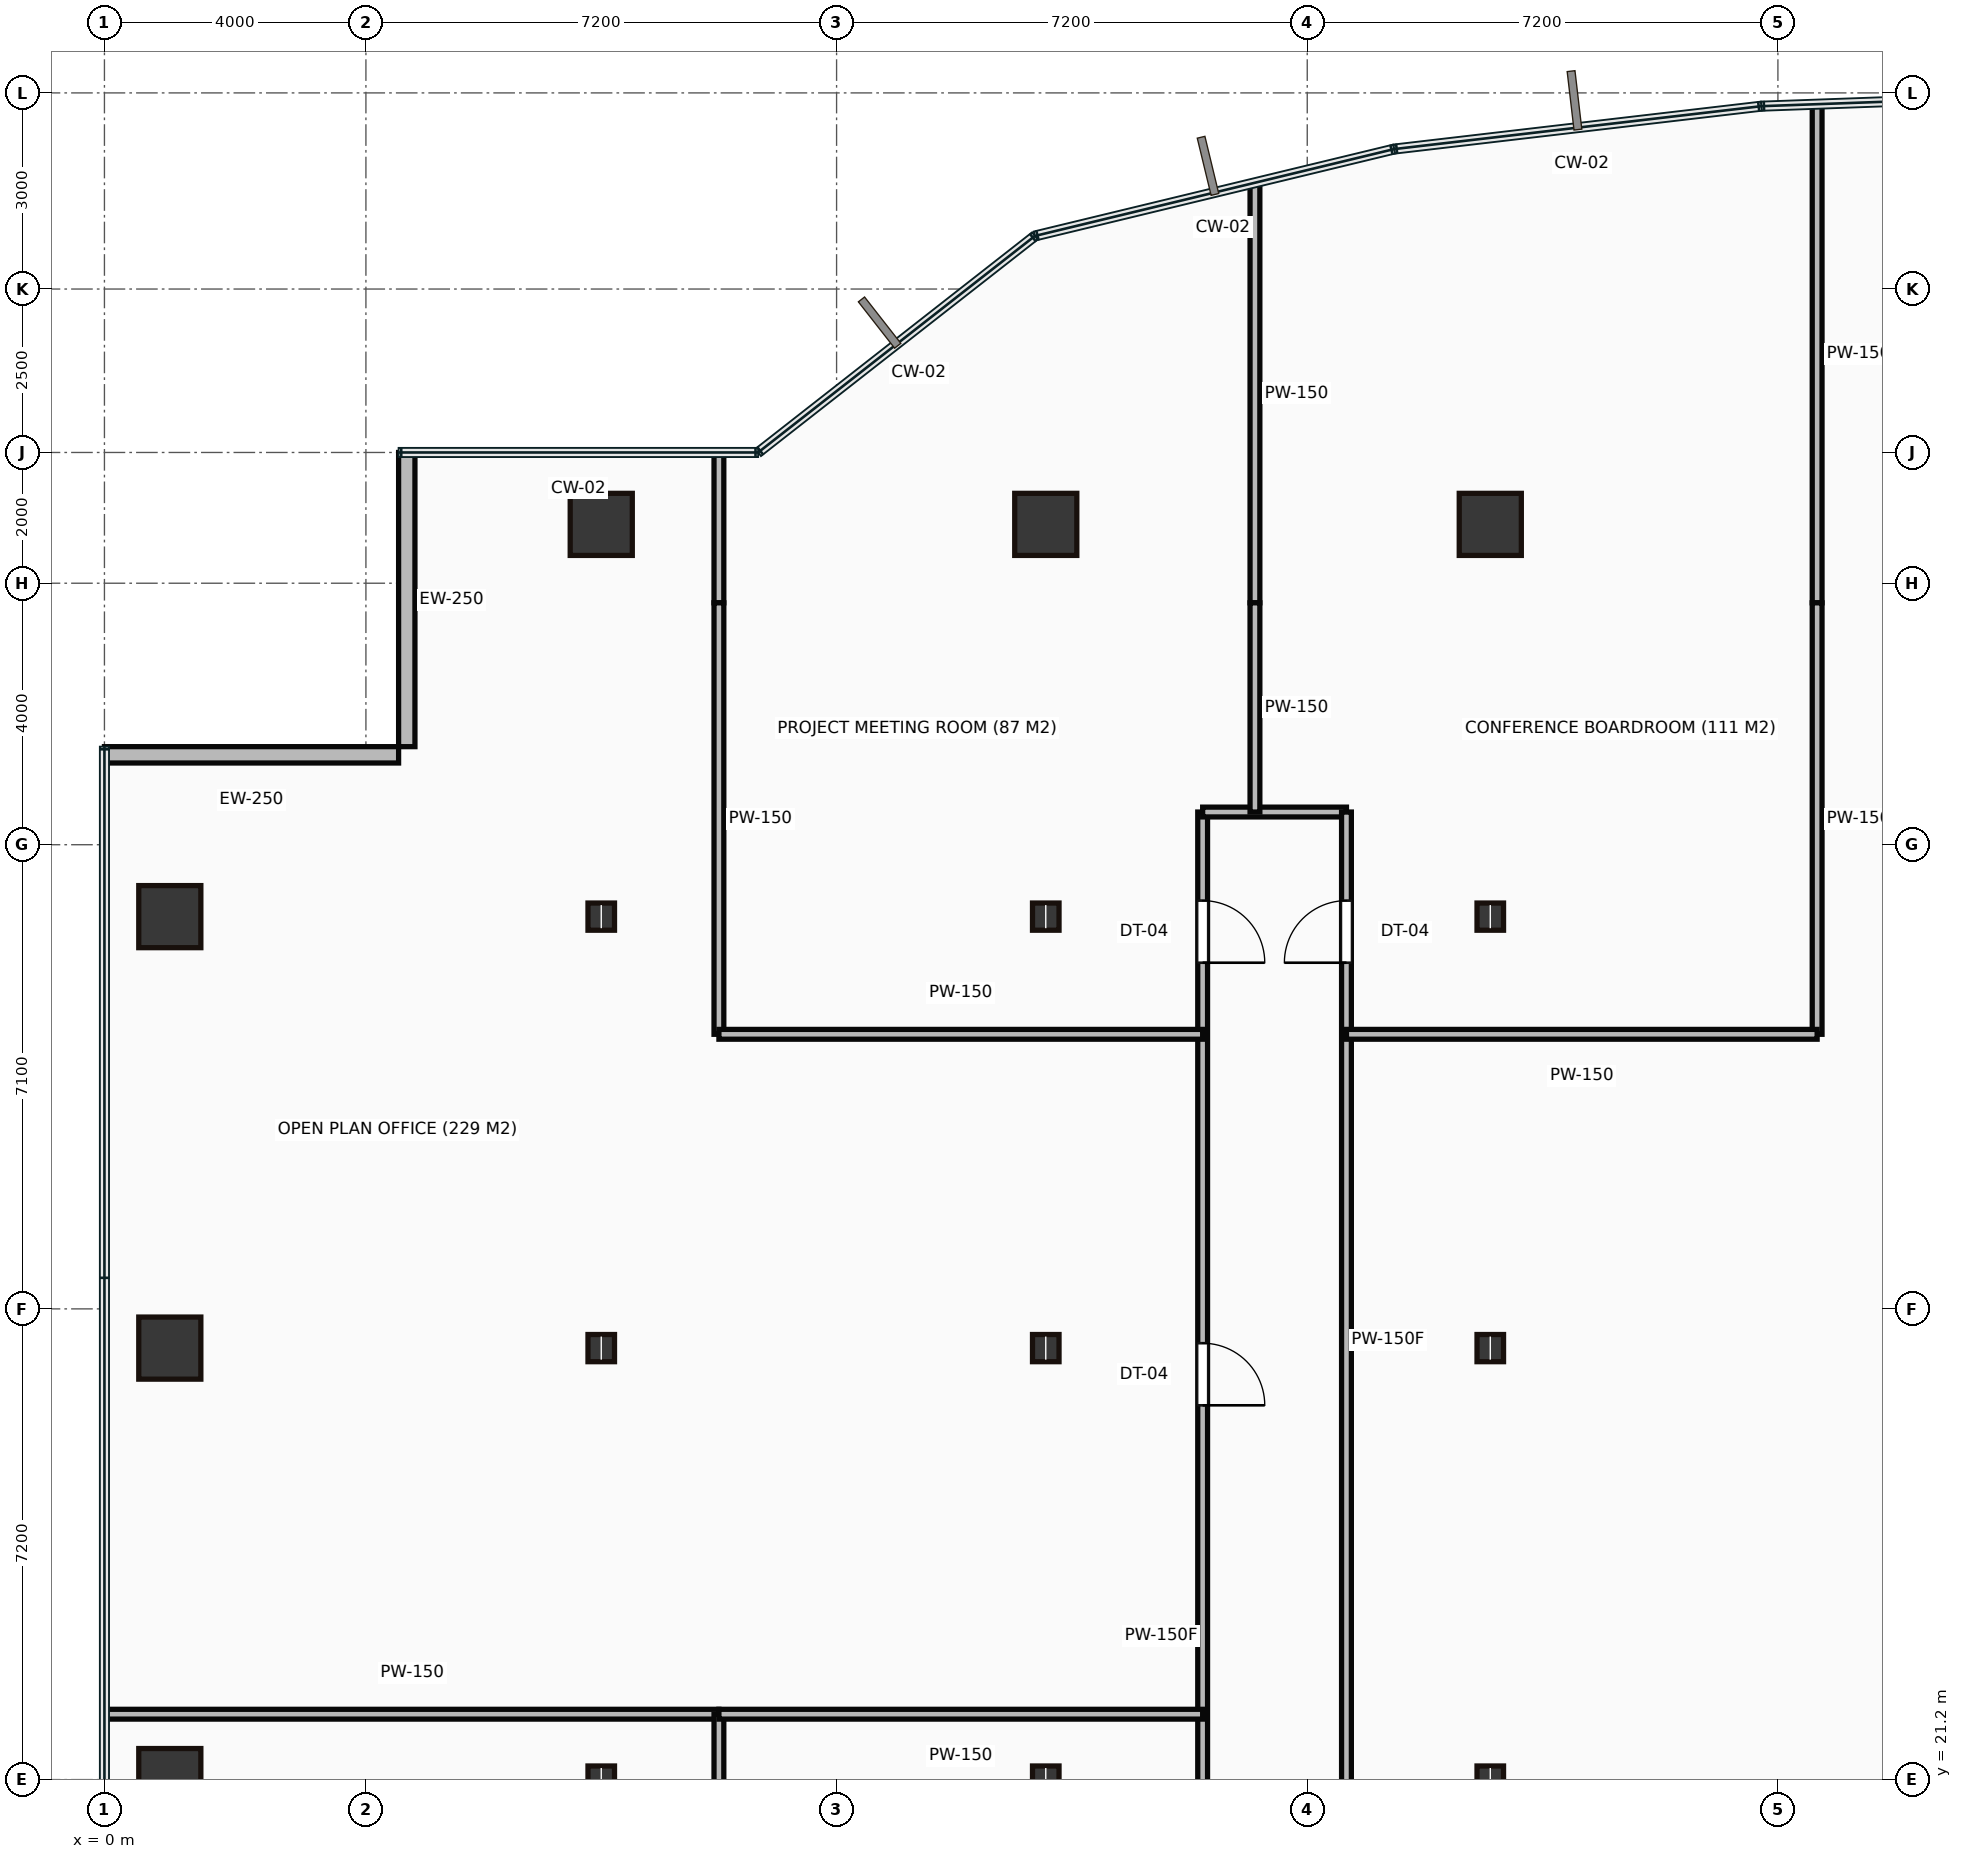
"""IFC4 building model, lengths in metres.
Left out: names, types, materials, properties, quantities, classifications, styles, units other than length and angle.
Written with IfcOpenShell. Run it as: python <this file> out.ifc"""

import sys

from ifc_helpers import new_model, si_unit, direction, frame, frame_2d, origin, origin_2d, place, context, subcontext, project, spatial, rectangle, hollow_rectangle, i_section, extrude, source, transform, mapped, element, fill, save


model = new_model("IFC4")
c1 = context("Model", 3, precision=1e-05, world=origin(), true_north=direction((0.0, 1.0)))
c2 = subcontext(c1, "Body", "Model", "MODEL_VIEW")
j1 = project(units=[si_unit("LENGTHUNIT", "METRE"), si_unit("PLANEANGLEUNIT", "RADIAN")], contexts=[c1])
p1 = place(None, origin())
s1 = spatial("IfcSite", under=j1, at=p1, CompositionType="ELEMENT")
p2 = place(p1, origin())
s2 = spatial("IfcBuilding", under=s1, at=p2, CompositionType="ELEMENT")
p3 = place(p2, frame((0.0, 0.0, 76.3)))
s3 = spatial("IfcBuildingStorey", under=s2, at=p3, CompositionType="ELEMENT", Elevation=76.3)
m1 = source(origin(), c2, "Body", "SweptSolid", [
    extrude(hollow_rectangle(XDim=0.95, YDim=0.95, WallThickness=0.045, at=origin_2d()), origin(), (0.0, 0.0, 1.0), 3.65),
])
for number, where, z_axis, x_axis in (
    (1, (1.0, 21.2, 0.0), (0.0, 0.0, 1.0), (1.0, 0.0, 0.0)),
    (2, (1.0, 27.8, 0.0), (0.0, 0.0, 1.0), (1.0, 0.0, 0.0)),
    (3, (1.0, 34.4, 0.0), (0.0, 0.0, 1.0), (1.0, 0.0, 0.0)),
):
    element("IfcColumn", number, at=place(p3, frame(where, z_axis=z_axis, x_axis=x_axis)), inside=s3, PredefinedType="COLUMN", context=c2, shape_type="MappedRepresentation", body=[
        mapped(m1, transform((0.0, 0.0, 0.0))),
    ])
m2 = source(origin(), c2, "Body", "SweptSolid", [
    extrude(i_section(OverallWidth=0.406, OverallDepth=0.416, WebThickness=0.03, FlangeThickness=0.048, at=origin_2d()), origin(), (0.0, 0.0, 1.0), 3.65),
])
for number, where, z_axis, x_axis in (
    (4, (7.6, 21.2, 0.0), (0.0, 0.0, 1.0), (1.0, 0.0, 0.0)),
    (5, (7.6, 27.8, 0.0), (0.0, 0.0, 1.0), (1.0, 0.0, 0.0)),
    (6, (7.6, 34.4, 0.0), (0.0, 0.0, 1.0), (1.0, 0.0, 0.0)),
):
    element("IfcColumn", number, at=place(p3, frame(where, z_axis=z_axis, x_axis=x_axis)), inside=s3, PredefinedType="COLUMN", context=c2, shape_type="MappedRepresentation", body=[
        mapped(m2, transform((0.0, 0.0, 0.0))),
    ])
p4 = place(p3, frame((7.6, 40.4, 0.0), z_axis=(0.0, 0.0, 1.0), x_axis=(1.0, 0.0, 0.0)))
e7 = element("IfcColumn", 7, at=p4, inside=s3, PredefinedType="COLUMN", context=c2, shape_type="MappedRepresentation", body=[
    mapped(m1, transform((0.0, 0.0, 0.0))),
])
for number, where, z_axis, x_axis in (
    (8, (14.4, 21.2, 0.0), (0.0, 0.0, 1.0), (1.0, 0.0, 0.0)),
    (9, (14.4, 27.8, 0.0), (0.0, 0.0, 1.0), (1.0, 0.0, 0.0)),
    (10, (14.4, 34.4, 0.0), (0.0, 0.0, 1.0), (1.0, 0.0, 0.0)),
):
    element("IfcColumn", number, at=place(p3, frame(where, z_axis=z_axis, x_axis=x_axis)), inside=s3, PredefinedType="COLUMN", context=c2, shape_type="MappedRepresentation", body=[
        mapped(m2, transform((0.0, 0.0, 0.0))),
    ])
p5 = place(p3, frame((14.4, 40.4, 0.0), z_axis=(0.0, 0.0, 1.0), x_axis=(1.0, 0.0, 0.0)))
e11 = element("IfcColumn", 11, at=p5, inside=s3, PredefinedType="COLUMN", context=c2, shape_type="MappedRepresentation", body=[
    mapped(m1, transform((0.0, 0.0, 0.0))),
])
for number, where, z_axis, x_axis in (
    (12, (21.2, 21.2, 0.0), (0.0, 0.0, 1.0), (1.0, 0.0, 0.0)),
    (13, (21.2, 27.8, 0.0), (0.0, 0.0, 1.0), (1.0, 0.0, 0.0)),
    (14, (21.2, 34.4, 0.0), (0.0, 0.0, 1.0), (1.0, 0.0, 0.0)),
):
    element("IfcColumn", number, at=place(p3, frame(where, z_axis=z_axis, x_axis=x_axis)), inside=s3, PredefinedType="COLUMN", context=c2, shape_type="MappedRepresentation", body=[
        mapped(m2, transform((0.0, 0.0, 0.0))),
    ])
p6 = place(p3, frame((21.2, 40.4, 0.0), z_axis=(0.0, 0.0, 1.0), x_axis=(1.0, 0.0, 0.0)))
e15 = element("IfcColumn", 15, at=p6, inside=s3, PredefinedType="COLUMN", context=c2, shape_type="MappedRepresentation", body=[
    mapped(m1, transform((0.0, 0.0, 0.0))),
])
m3 = source(origin(), c2, "Body", "SweptSolid", [
    extrude(rectangle(XDim=4.5, YDim=0.25, at=frame_2d((2.25, 0.0))), origin(), (0.0, 0.0, 1.0), 3.4),
])
for number, where, z_axis, x_axis in (
    (16, (4.625, 41.5, 0.0), (0.0, 0.0, 1.0), (0.0, -1.0, 0.0)),
    (17, (4.5, 36.875, 0.0), (0.0, 0.0, 1.0), (-1.0, 0.0, 0.0)),
):
    element("IfcWall", number, at=place(p3, frame(where, z_axis=z_axis, x_axis=x_axis)), inside=s3, PredefinedType="STANDARD", context=c2, shape_type="MappedRepresentation", body=[
        mapped(m3, transform((0.0, 0.0, 0.0))),
    ])
m4 = source(origin(), c2, "Body", "SweptSolid", [
    extrude(rectangle(XDim=16.15, YDim=0.15, at=frame_2d((8.075, 0.0))), origin(), (0.0, 0.0, 1.0), 3.4),
])
p7 = place(p3, frame((16.8, 19.85, 0.0), z_axis=(0.0, 0.0, 1.0), x_axis=(0.0, 1.0, 0.0)))
e18 = element("IfcWall", 18, at=p7, inside=s3, PredefinedType="PARTITIONING", context=c2, shape_type="MappedRepresentation", body=[
    mapped(m4, transform((0.0, 0.0, 0.0))),
])
p8 = place(p7, frame((7.075, 0.0, 0.0)))
e19 = element("IfcOpeningElement", 19, at=p8, cuts=e18, PredefinedType="OPENING", context=c2, shape_type="SweptSolid", body=[
    extrude(rectangle(XDim=0.95, YDim=2.15, at=frame_2d((0.475, 1.075))), frame((0.0, 0.085, 0.0), z_axis=(0.0, -1.0, 0.0), x_axis=(1.0, 0.0, 0.0)), (0.0, 0.0, 1.0), 0.17),
])
p9 = place(p7, frame((13.845, 0.0, 0.0)))
e20 = element("IfcOpeningElement", 20, at=p9, cuts=e18, PredefinedType="OPENING", context=c2, shape_type="SweptSolid", body=[
    extrude(rectangle(XDim=0.95, YDim=2.15, at=frame_2d((0.475, 1.075))), frame((0.0, 0.085, 0.0), z_axis=(0.0, -1.0, 0.0), x_axis=(1.0, 0.0, 0.0)), (0.0, 0.0, 1.0), 0.17),
])
m5 = source(origin(), c2, "Body", "SweptSolid", [
    extrude(rectangle(XDim=2.2, YDim=0.15, at=frame_2d((1.1, 0.0))), origin(), (0.0, 0.0, 1.0), 3.4),
])
p10 = place(p3, frame((16.8, 36.0, 0.0), z_axis=(0.0, 0.0, 1.0), x_axis=(1.0, 0.0, 0.0)))
e21 = element("IfcWall", 21, at=p10, inside=s3, PredefinedType="PARTITIONING", context=c2, shape_type="MappedRepresentation", body=[
    mapped(m5, transform((0.0, 0.0, 0.0))),
])
p11 = place(p3, frame((19.0, 36.0, 0.0), z_axis=(0.0, 0.0, 1.0), x_axis=(0.0, -1.0, 0.0)))
e22 = element("IfcWall", 22, at=p11, inside=s3, PredefinedType="PARTITIONING", context=c2, shape_type="MappedRepresentation", body=[
    mapped(m4, transform((0.0, 0.0, 0.0))),
])
p12 = place(p11, frame((1.355, 0.0, 0.0)))
e23 = element("IfcOpeningElement", 23, at=p12, cuts=e22, PredefinedType="OPENING", context=c2, shape_type="SweptSolid", body=[
    extrude(rectangle(XDim=0.95, YDim=2.15, at=frame_2d((0.475, 1.075))), frame((0.0, 0.085, 0.0), z_axis=(0.0, -1.0, 0.0), x_axis=(1.0, 0.0, 0.0)), (0.0, 0.0, 1.0), 0.17),
])
m6 = source(origin(), c2, "Body", "SweptSolid", [
    extrude(rectangle(XDim=9.38, YDim=0.15, at=frame_2d((4.69, 0.0))), origin(), (0.0, 0.0, 1.0), 3.4),
])
p13 = place(p3, frame((0.02, 22.2, 0.0), z_axis=(0.0, 0.0, 1.0), x_axis=(1.0, 0.0, 0.0)))
e24 = element("IfcWall", 24, at=p13, inside=s3, PredefinedType="PARTITIONING", context=c2, shape_type="MappedRepresentation", body=[
    mapped(m6, transform((0.0, 0.0, 0.0))),
])
m7 = source(origin(), c2, "Body", "SweptSolid", [
    extrude(rectangle(XDim=5.95, YDim=0.15, at=frame_2d((2.975, 0.0))), origin(), (0.0, 0.0, 1.0), 3.4),
])
p14 = place(p3, frame((9.4, 22.2, 0.0), z_axis=(0.0, 0.0, 1.0), x_axis=(0.0, -1.0, 0.0)))
e25 = element("IfcWall", 25, at=p14, inside=s3, PredefinedType="PARTITIONING", context=c2, shape_type="MappedRepresentation", body=[
    mapped(m7, transform((0.0, 0.0, 0.0))),
])
m8 = source(origin(), c2, "Body", "SweptSolid", [
    extrude(rectangle(XDim=7.4, YDim=0.15, at=frame_2d((3.7, 0.0))), origin(), (0.0, 0.0, 1.0), 3.4),
])
p15 = place(p3, frame((16.8, 22.2, 0.0), z_axis=(0.0, 0.0, 1.0), x_axis=(-1.0, 0.0, 0.0)))
e26 = element("IfcWall", 26, at=p15, inside=s3, PredefinedType="PARTITIONING", context=c2, shape_type="MappedRepresentation", body=[
    mapped(m8, transform((0.0, 0.0, 0.0))),
])
m9 = source(origin(), c2, "Body", "SweptSolid", [
    extrude(rectangle(XDim=2.28, YDim=0.15, at=frame_2d((1.14, 0.0))), origin(), (0.0, 0.0, 1.0), 3.4),
])
p16 = place(p3, frame((9.4, 41.48, 0.0), z_axis=(0.0, 0.0, 1.0), x_axis=(0.0, -1.0, 0.0)))
e27 = element("IfcWall", 27, at=p16, inside=s3, PredefinedType="PARTITIONING", context=c2, shape_type="MappedRepresentation", body=[
    mapped(m9, transform((0.0, 0.0, 0.0))),
])
m10 = source(origin(), c2, "Body", "SweptSolid", [
    extrude(rectangle(XDim=6.6, YDim=0.15, at=frame_2d((3.3, 0.0))), origin(), (0.0, 0.0, 1.0), 3.4),
])
p17 = place(p3, frame((9.4, 39.2, 0.0), z_axis=(0.0, 0.0, 1.0), x_axis=(0.0, -1.0, 0.0)))
e28 = element("IfcWall", 28, at=p17, inside=s3, PredefinedType="PARTITIONING", context=c2, shape_type="MappedRepresentation", body=[
    mapped(m10, transform((0.0, 0.0, 0.0))),
])
p18 = place(p3, frame((9.4, 32.6, 0.0), z_axis=(0.0, 0.0, 1.0), x_axis=(1.0, 0.0, 0.0)))
e29 = element("IfcWall", 29, at=p18, inside=s3, PredefinedType="PARTITIONING", context=c2, shape_type="MappedRepresentation", body=[
    mapped(m8, transform((0.0, 0.0, 0.0))),
])
m11 = source(origin(), c2, "Body", "SweptSolid", [
    extrude(rectangle(XDim=6.405, YDim=0.15, at=frame_2d((3.203, 0.0))), origin(), (0.0, 0.0, 1.0), 3.4),
])
p19 = place(p3, frame((17.6, 45.605, 0.0), z_axis=(0.0, 0.0, 1.0), x_axis=(0.0, -1.0, 0.0)))
e30 = element("IfcWall", 30, at=p19, inside=s3, PredefinedType="PARTITIONING", context=c2, shape_type="MappedRepresentation", body=[
    mapped(m11, transform((0.0, 0.0, 0.0))),
])
m12 = source(origin(), c2, "Body", "SweptSolid", [
    extrude(rectangle(XDim=3.2, YDim=0.15, at=frame_2d((1.6, 0.0))), origin(), (0.0, 0.0, 1.0), 3.4),
])
p20 = place(p3, frame((17.6, 39.2, 0.0), z_axis=(0.0, 0.0, 1.0), x_axis=(0.0, -1.0, 0.0)))
e31 = element("IfcWall", 31, at=p20, inside=s3, PredefinedType="PARTITIONING", context=c2, shape_type="MappedRepresentation", body=[
    mapped(m12, transform((0.0, 0.0, 0.0))),
])
m13 = source(origin(), c2, "Body", "SweptSolid", [
    extrude(rectangle(XDim=7.608, YDim=0.15, at=frame_2d((3.804, 0.0))), origin(), (0.0, 0.0, 1.0), 3.4),
])
p21 = place(p3, frame((26.2, 46.808, 0.0), z_axis=(0.0, 0.0, 1.0), x_axis=(0.0, -1.0, 0.0)))
e32 = element("IfcWall", 32, at=p21, inside=s3, PredefinedType="PARTITIONING", context=c2, shape_type="MappedRepresentation", body=[
    mapped(m13, transform((0.0, 0.0, 0.0))),
])
p22 = place(p3, frame((26.2, 39.2, 0.0), z_axis=(0.0, 0.0, 1.0), x_axis=(0.0, -1.0, 0.0)))
e33 = element("IfcWall", 33, at=p22, inside=s3, PredefinedType="PARTITIONING", context=c2, shape_type="MappedRepresentation", body=[
    mapped(m10, transform((0.0, 0.0, 0.0))),
])
m14 = source(origin(), c2, "Body", "SweptSolid", [
    extrude(rectangle(XDim=7.2, YDim=0.15, at=frame_2d((3.6, 0.0))), origin(), (0.0, 0.0, 1.0), 3.4),
])
p23 = place(p3, frame((26.2, 32.6, 0.0), z_axis=(0.0, 0.0, 1.0), x_axis=(-1.0, 0.0, 0.0)))
e34 = element("IfcWall", 34, at=p23, inside=s3, PredefinedType="PARTITIONING", context=c2, shape_type="MappedRepresentation", body=[
    mapped(m14, transform((0.0, 0.0, 0.0))),
])
m15 = source(origin(), c2, "Body", "SweptSolid", [
    extrude(rectangle(XDim=0.95, YDim=2.15, at=frame_2d((0.475, 1.075))), frame((0.0, 0.025, 0.0), z_axis=(0.0, -1.0, 0.0), x_axis=(1.0, 0.0, 0.0)), (0.0, 0.0, 1.0), 0.05),
])
p24 = place(p8, origin())
e35 = element("IfcDoor", 35, at=p24, inside=s3, OperationType="SINGLE_SWING_LEFT", PredefinedType="DOOR", context=c2, shape_type="MappedRepresentation", body=[
    mapped(m15, transform((0.0, 0.0, 0.0))),
])
fill(e19, e35)
p25 = place(p9, origin())
e36 = element("IfcDoor", 36, at=p25, inside=s3, OperationType="SINGLE_SWING_LEFT", PredefinedType="DOOR", context=c2, shape_type="MappedRepresentation", body=[
    mapped(m15, transform((0.0, 0.0, 0.0))),
])
fill(e20, e36)
p26 = place(p12, origin())
e37 = element("IfcDoor", 37, at=p26, inside=s3, OperationType="SINGLE_SWING_RIGHT", PredefinedType="DOOR", context=c2, shape_type="MappedRepresentation", body=[
    mapped(m15, transform((0.0, 0.0, 0.0))),
])
fill(e23, e37)
save(model, sys.argv[1])
